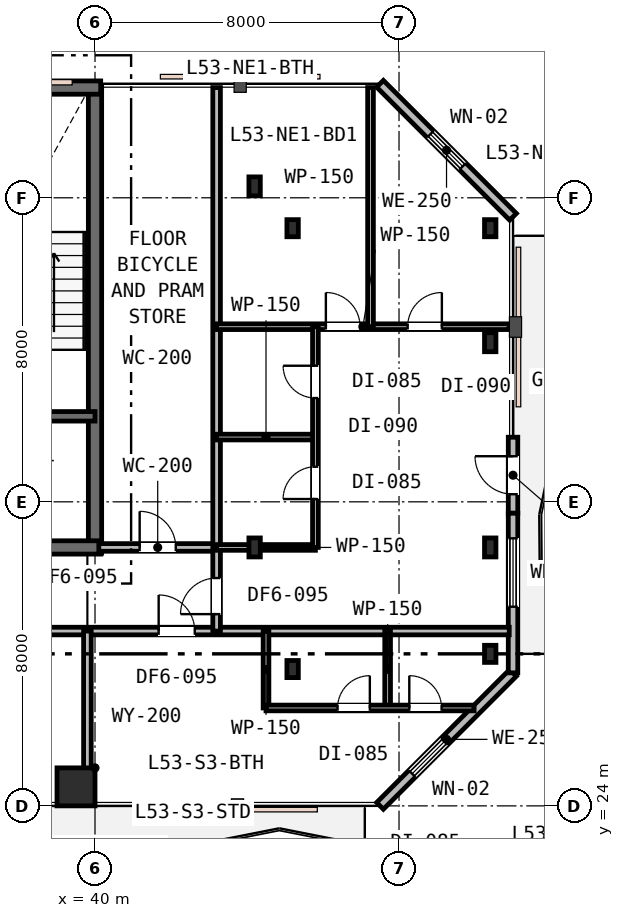
"""IFC4 building model, lengths in metres.
Left out: names, types, materials, properties, quantities, classifications, styles, units other than length and angle.
Written with IfcOpenShell. Run it as: python <this file> out.ifc"""

import sys

from ifc_helpers import new_model, si_unit, direction, frame, frame_2d, origin, origin_2d, place, context, subcontext, project, spatial, rectangle, i_section, extrude, element, fill, save


model = new_model("IFC4")
c1 = context("Model", 3, precision=1e-05, world=origin(), true_north=direction((0.0, 1.0)))
c2 = subcontext(c1, "Body", "Model", "MODEL_VIEW")
j1 = project(units=[si_unit("LENGTHUNIT", "METRE"), si_unit("PLANEANGLEUNIT", "RADIAN")], contexts=[c1])
p1 = place(None, origin())
s1 = spatial("IfcSite", under=j1, at=p1, CompositionType="ELEMENT")
p2 = place(p1, origin())
s2 = spatial("IfcBuilding", under=s1, at=p2, CompositionType="ELEMENT")
p3 = place(p2, frame((0.0, 0.0, 204.6)))
s3 = spatial("IfcBuildingStorey", under=s2, at=p3, CompositionType="ELEMENT", Elevation=204.6)
p4 = place(p3, frame((40.0, 30.65, 0.0), z_axis=(0.0, 0.0, 1.0), x_axis=(0.0, 1.0, 0.0)))
e1 = element("IfcWall", 1, at=p4, inside=s3, PredefinedType="SHEAR", context=c2, shape_type="SweptSolid", body=[
    extrude(rectangle(XDim=12.3, YDim=0.35, at=frame_2d((6.15, 0.0))), origin(), (0.0, 0.0, 1.0), 3.6),
])
p5 = place(p3, frame((15.85, 42.9, 0.0), z_axis=(0.0, 0.0, 1.0), x_axis=(1.0, 0.0, 0.0)))
e2 = element("IfcWall", 2, at=p5, inside=s3, PredefinedType="SHEAR", context=c2, shape_type="SweptSolid", body=[
    extrude(rectangle(XDim=24.3, YDim=0.35, at=frame_2d((12.15, 0.0))), origin(), (0.0, 0.0, 1.0), 3.6),
])
p6 = place(p5, frame((1.6, 0.0, 0.95)))
e3 = element("IfcOpeningElement", 3, at=p6, cuts=e2, PredefinedType="OPENING", context=c2, shape_type="SweptSolid", body=[
    extrude(rectangle(XDim=1.2, YDim=1.6, at=frame_2d((0.6, 0.8))), frame((0.0, 0.185, 0.0), z_axis=(0.0, -1.0, 0.0), x_axis=(1.0, 0.0, 0.0)), (0.0, 0.0, 1.0), 0.37),
])
p7 = place(p5, frame((16.5, 0.0, 0.95)))
e4 = element("IfcOpeningElement", 4, at=p7, cuts=e2, PredefinedType="OPENING", context=c2, shape_type="SweptSolid", body=[
    extrude(rectangle(XDim=1.2, YDim=1.6, at=frame_2d((0.6, 0.8))), frame((0.0, 0.185, 0.0), z_axis=(0.0, -1.0, 0.0), x_axis=(1.0, 0.0, 0.0)), (0.0, 0.0, 1.0), 0.37),
])
p8 = place(p5, frame((21.6, 0.0, 0.95)))
e5 = element("IfcOpeningElement", 5, at=p8, cuts=e2, PredefinedType="OPENING", context=c2, shape_type="SweptSolid", body=[
    extrude(rectangle(XDim=1.2, YDim=1.6, at=frame_2d((0.6, 0.8))), frame((0.0, 0.185, 0.0), z_axis=(0.0, -1.0, 0.0), x_axis=(1.0, 0.0, 0.0)), (0.0, 0.0, 1.0), 0.37),
])
p9 = place(p3, frame((28.95, 30.8, 0.0), z_axis=(0.0, 0.0, 1.0), x_axis=(1.0, 0.0, 0.0)))
e6 = element("IfcWall", 6, at=p9, inside=s3, PredefinedType="SHEAR", context=c2, shape_type="SweptSolid", body=[
    extrude(rectangle(XDim=11.2, YDim=0.35, at=frame_2d((5.6, 0.0))), origin(), (0.0, 0.0, 1.0), 3.6),
])
p10 = place(p9, frame((7.65, 0.0, 0.0)))
e7 = element("IfcOpeningElement", 7, at=p10, cuts=e6, PredefinedType="OPENING", context=c2, shape_type="SweptSolid", body=[
    extrude(rectangle(XDim=1.1, YDim=2.15, at=frame_2d((0.55, 1.075))), frame((0.0, 0.185, 0.0), z_axis=(0.0, -1.0, 0.0), x_axis=(1.0, 0.0, 0.0)), (0.0, 0.0, 1.0), 0.37),
])
p11 = place(p3, frame((33.95, 34.25, 0.0), z_axis=(0.0, 0.0, 1.0), x_axis=(1.0, 0.0, 0.0)))
e8 = element("IfcWall", 8, at=p11, inside=s3, PredefinedType="SHEAR", context=c2, shape_type="SweptSolid", body=[
    extrude(rectangle(XDim=6.05, YDim=0.25, at=frame_2d((3.025, 0.0))), origin(), (0.0, 0.0, 1.0), 3.6),
])
p12 = place(p11, frame((3.7, 0.0, 0.0)))
e9 = element("IfcOpeningElement", 9, at=p12, cuts=e8, PredefinedType="OPENING", context=c2, shape_type="SweptSolid", body=[
    extrude(rectangle(XDim=1.0, YDim=2.15, at=frame_2d((0.5, 1.075))), frame((0.0, 0.135, 0.0), z_axis=(0.0, -1.0, 0.0), x_axis=(1.0, 0.0, 0.0)), (0.0, 0.0, 1.0), 0.27),
])
p13 = place(p11, frame((0.55, 0.0, 0.0)))
e10 = element("IfcOpeningElement", 10, at=p13, cuts=e8, PredefinedType="OPENING", context=c2, shape_type="SweptSolid", body=[
    extrude(rectangle(XDim=1.1, YDim=2.15, at=frame_2d((0.55, 1.075))), frame((0.0, 0.135, 0.0), z_axis=(0.0, -1.0, 0.0), x_axis=(1.0, 0.0, 0.0)), (0.0, 0.0, 1.0), 0.27),
])
p14 = place(p3, frame((39.5, 24.5, 0.0), z_axis=(0.0, 0.0, 1.0), x_axis=(1.0, 0.0, 0.0)))
e11 = element("IfcColumn", 11, at=p14, inside=s3, PredefinedType="COLUMN", context=c2, shape_type="SweptSolid", body=[
    extrude(rectangle(XDim=1.0, YDim=1.0, at=origin_2d()), origin(), (0.0, 0.0, 1.0), 3.6),
])
for number, where, z_axis, x_axis in (
    (12, (45.2, 27.6, 0.0), (0.0, 0.0, 1.0), (1.0, 0.0, 0.0)),
    (13, (45.2, 39.2, 0.0), (0.0, 0.0, 1.0), (1.0, 0.0, 0.0)),
    (14, (50.4, 28.0, 0.0), (0.0, 0.0, 1.0), (1.0, 0.0, 0.0)),
    (15, (50.4, 39.2, 0.0), (0.0, 0.0, 1.0), (1.0, 0.0, 0.0)),
):
    element("IfcColumn", number, at=place(p3, frame(where, z_axis=z_axis, x_axis=x_axis)), inside=s3, PredefinedType="COLUMN", context=c2, shape_type="SweptSolid", body=[
        extrude(i_section(OverallWidth=0.3, OverallDepth=0.45, WebThickness=0.014, FlangeThickness=0.026, FilletRadius=0.027, at=origin_2d()), origin(), (0.0, 0.0, 1.0), 3.6),
    ])
for number, where, z_axis, x_axis in (
    (16, (44.2, 30.8, 0.0), (0.0, 0.0, 1.0), (1.0, 0.0, 0.0)),
    (17, (44.2, 40.3, 0.0), (0.0, 0.0, 1.0), (1.0, 0.0, 0.0)),
    (18, (50.4, 30.8, 0.0), (0.0, 0.0, 1.0), (1.0, 0.0, 0.0)),
    (19, (50.4, 36.2, 0.0), (0.0, 0.0, 1.0), (1.0, 0.0, 0.0)),
):
    element("IfcColumn", number, at=place(p3, frame(where, z_axis=z_axis, x_axis=x_axis)), inside=s3, PredefinedType="COLUMN", context=c2, shape_type="SweptSolid", body=[
        extrude(i_section(OverallWidth=0.3, OverallDepth=0.5, WebThickness=0.015, FlangeThickness=0.028, FilletRadius=0.027, at=origin_2d()), origin(), (0.0, 0.0, 1.0), 3.6),
    ])
p15 = place(p3, frame((47.5, 24.0, 0.0), z_axis=(0.0, 0.0, 1.0), x_axis=(0.707106781187, 0.707106781187, 0.0)))
e20 = element("IfcWall", 20, at=p15, inside=s3, PredefinedType="STANDARD", context=c2, shape_type="SweptSolid", body=[
    extrude(rectangle(XDim=4.95, YDim=0.25, at=frame_2d((2.475, 0.0))), origin(), (0.0, 0.0, 1.0), 3.24),
])
p16 = place(p15, frame((1.196, 0.0, 0.85)))
e21 = element("IfcOpeningElement", 21, at=p16, cuts=e20, PredefinedType="OPENING", context=c2, shape_type="SweptSolid", body=[
    extrude(rectangle(XDim=1.2, YDim=1.6, at=frame_2d((0.6, 0.8))), frame((0.0, 0.135, 0.0), z_axis=(0.0, -1.0, 0.0), x_axis=(1.0, 0.0, 0.0)), (0.0, 0.0, 1.0), 0.27),
])
p17 = place(p3, frame((51.0, 31.7, 0.0), z_axis=(0.0, 0.0, 1.0), x_axis=(0.0, 1.0, 0.0)))
e22 = element("IfcWall", 22, at=p17, inside=s3, PredefinedType="STANDARD", context=c2, shape_type="SweptSolid", body=[
    extrude(rectangle(XDim=2.0, YDim=0.25, at=frame_2d((1.0, 0.0))), origin(), (0.0, 0.0, 1.0), 3.24),
])
p18 = place(p17, frame((0.5, 0.0, 0.0)))
e23 = element("IfcOpeningElement", 23, at=p18, cuts=e22, PredefinedType="OPENING", context=c2, shape_type="SweptSolid", body=[
    extrude(rectangle(XDim=1.0, YDim=2.15, at=frame_2d((0.5, 1.075))), frame((0.0, 0.135, 0.0), z_axis=(0.0, -1.0, 0.0), x_axis=(1.0, 0.0, 0.0)), (0.0, 0.0, 1.0), 0.27),
])
p19 = place(p3, frame((51.0, 27.5, 0.0), z_axis=(0.0, 0.0, 1.0), x_axis=(0.0, 1.0, 0.0)))
e24 = element("IfcWall", 24, at=p19, inside=s3, PredefinedType="STANDARD", context=c2, shape_type="SweptSolid", body=[
    extrude(rectangle(XDim=4.2, YDim=0.25, at=frame_2d((2.1, 0.0))), origin(), (0.0, 0.0, 1.0), 3.24),
])
p20 = place(p19, frame((1.74, 0.0, 0.75)))
e25 = element("IfcOpeningElement", 25, at=p20, cuts=e24, PredefinedType="OPENING", context=c2, shape_type="SweptSolid", body=[
    extrude(rectangle(XDim=1.8, YDim=1.85, at=frame_2d((0.9, 0.925))), frame((0.0, 0.135, 0.0), z_axis=(0.0, -1.0, 0.0), x_axis=(1.0, 0.0, 0.0)), (0.0, 0.0, 1.0), 0.27),
])
p21 = place(p3, frame((51.0, 39.5, 0.0), z_axis=(0.0, 0.0, 1.0), x_axis=(-0.707106781187, 0.707106781187, 0.0)))
e26 = element("IfcWall", 26, at=p21, inside=s3, PredefinedType="STANDARD", context=c2, shape_type="SweptSolid", body=[
    extrude(rectangle(XDim=4.95, YDim=0.25, at=frame_2d((2.475, 0.0))), origin(), (0.0, 0.0, 1.0), 3.24),
])
p22 = place(p21, frame((1.875, 0.0, 0.85)))
e27 = element("IfcOpeningElement", 27, at=p22, cuts=e26, PredefinedType="OPENING", context=c2, shape_type="SweptSolid", body=[
    extrude(rectangle(XDim=1.2, YDim=1.6, at=frame_2d((0.6, 0.8))), frame((0.0, 0.135, 0.0), z_axis=(0.0, -1.0, 0.0), x_axis=(1.0, 0.0, 0.0)), (0.0, 0.0, 1.0), 0.27),
])
p23 = place(p3, frame((15.4, 28.6, 0.0), z_axis=(0.0, 0.0, 1.0), x_axis=(1.0, 0.0, 0.0)))
e28 = element("IfcWall", 28, at=p23, inside=s3, PredefinedType="PARTITIONING", context=c2, shape_type="SweptSolid", body=[
    extrude(rectangle(XDim=35.5, YDim=0.2, at=frame_2d((17.75, 0.0))), origin(), (0.0, 0.0, 1.0), 2.63),
])
p24 = place(p23, frame((11.525, 0.0, 0.0)))
e29 = element("IfcOpeningElement", 29, at=p24, cuts=e28, PredefinedType="OPENING", context=c2, shape_type="SweptSolid", body=[
    extrude(rectangle(XDim=0.95, YDim=2.15, at=frame_2d((0.475, 1.075))), frame((0.0, 0.11, 0.0), z_axis=(0.0, -1.0, 0.0), x_axis=(1.0, 0.0, 0.0)), (0.0, 0.0, 1.0), 0.22),
])
p25 = place(p23, frame((19.425, 0.0, 0.0)))
e30 = element("IfcOpeningElement", 30, at=p25, cuts=e28, PredefinedType="OPENING", context=c2, shape_type="SweptSolid", body=[
    extrude(rectangle(XDim=0.95, YDim=2.15, at=frame_2d((0.475, 1.075))), frame((0.0, 0.11, 0.0), z_axis=(0.0, -1.0, 0.0), x_axis=(1.0, 0.0, 0.0)), (0.0, 0.0, 1.0), 0.22),
])
p26 = place(p23, frame((26.275, 0.0, 0.0)))
e31 = element("IfcOpeningElement", 31, at=p26, cuts=e28, PredefinedType="OPENING", context=c2, shape_type="SweptSolid", body=[
    extrude(rectangle(XDim=0.95, YDim=2.15, at=frame_2d((0.475, 1.075))), frame((0.0, 0.11, 0.0), z_axis=(0.0, -1.0, 0.0), x_axis=(1.0, 0.0, 0.0)), (0.0, 0.0, 1.0), 0.22),
])
p27 = place(p3, frame((40.1, 30.8, 0.0), z_axis=(0.0, 0.0, 1.0), x_axis=(1.0, 0.0, 0.0)))
e32 = element("IfcWall", 32, at=p27, inside=s3, PredefinedType="PARTITIONING", context=c2, shape_type="SweptSolid", body=[
    extrude(rectangle(XDim=3.1, YDim=0.2, at=frame_2d((1.55, 0.0))), origin(), (0.0, 0.0, 1.0), 2.63),
])
p28 = place(p27, frame((1.075, 0.0, 0.0)))
e33 = element("IfcOpeningElement", 33, at=p28, cuts=e32, PredefinedType="OPENING", context=c2, shape_type="SweptSolid", body=[
    extrude(rectangle(XDim=0.95, YDim=2.15, at=frame_2d((0.475, 1.075))), frame((0.0, 0.11, 0.0), z_axis=(0.0, -1.0, 0.0), x_axis=(1.0, 0.0, 0.0)), (0.0, 0.0, 1.0), 0.22),
])
p29 = place(p3, frame((43.2, 28.6, 0.0), z_axis=(0.0, 0.0, 1.0), x_axis=(0.0, 1.0, 0.0)))
e34 = element("IfcWall", 34, at=p29, inside=s3, PredefinedType="PARTITIONING", context=c2, shape_type="SweptSolid", body=[
    extrude(rectangle(XDim=14.3, YDim=0.2, at=frame_2d((7.15, 0.0))), origin(), (0.0, 0.0, 1.0), 2.63),
])
p30 = place(p29, frame((0.445, 0.0, 0.0)))
e35 = element("IfcOpeningElement", 35, at=p30, cuts=e34, PredefinedType="OPENING", context=c2, shape_type="SweptSolid", body=[
    extrude(rectangle(XDim=0.95, YDim=2.15, at=frame_2d((0.475, 1.075))), frame((0.0, 0.11, 0.0), z_axis=(0.0, -1.0, 0.0), x_axis=(1.0, 0.0, 0.0)), (0.0, 0.0, 1.0), 0.22),
])
for number, where, z_axis, x_axis in (
    (36, (43.2, 30.8, 0.0), (0.0, 0.0, 1.0), (1.0, 0.0, 0.0)),
    (37, (43.2, 33.704, 0.0), (0.0, 0.0, 1.0), (1.0, 0.0, 0.0)),
):
    element("IfcWall", number, at=place(p3, frame(where, z_axis=z_axis, x_axis=x_axis)), inside=s3, PredefinedType="PARTITIONING", context=c2, shape_type="SweptSolid", body=[
        extrude(rectangle(XDim=2.6, YDim=0.15, at=frame_2d((1.3, 0.0))), origin(), (0.0, 0.0, 1.0), 2.63),
    ])
p31 = place(p3, frame((43.2, 36.608, 0.0), z_axis=(0.0, 0.0, 1.0), x_axis=(1.0, 0.0, 0.0)))
e38 = element("IfcWall", 38, at=p31, inside=s3, PredefinedType="PARTITIONING", context=c2, shape_type="SweptSolid", body=[
    extrude(rectangle(XDim=7.7, YDim=0.15, at=frame_2d((3.85, 0.0))), origin(), (0.0, 0.0, 1.0), 2.63),
])
p32 = place(p31, frame((2.875, 0.0, 0.0)))
e39 = element("IfcOpeningElement", 39, at=p32, cuts=e38, PredefinedType="OPENING", context=c2, shape_type="SweptSolid", body=[
    extrude(rectangle(XDim=0.9, YDim=2.15, at=frame_2d((0.45, 1.075))), frame((0.0, 0.085, 0.0), z_axis=(0.0, -1.0, 0.0), x_axis=(1.0, 0.0, 0.0)), (0.0, 0.0, 1.0), 0.17),
])
p33 = place(p31, frame((5.027, 0.0, 0.0)))
e40 = element("IfcOpeningElement", 40, at=p33, cuts=e38, PredefinedType="OPENING", context=c2, shape_type="SweptSolid", body=[
    extrude(rectangle(XDim=0.9, YDim=2.15, at=frame_2d((0.45, 1.075))), frame((0.0, 0.085, 0.0), z_axis=(0.0, -1.0, 0.0), x_axis=(1.0, 0.0, 0.0)), (0.0, 0.0, 1.0), 0.17),
])
p34 = place(p3, frame((45.8, 30.8, 0.0), z_axis=(0.0, 0.0, 1.0), x_axis=(0.0, 1.0, 0.0)))
e41 = element("IfcWall", 41, at=p34, inside=s3, PredefinedType="PARTITIONING", context=c2, shape_type="SweptSolid", body=[
    extrude(rectangle(XDim=5.808, YDim=0.15, at=frame_2d((2.904, 0.0))), origin(), (0.0, 0.0, 1.0), 2.63),
])
p35 = place(p34, frame((1.274, 0.0, 0.0)))
e42 = element("IfcOpeningElement", 42, at=p35, cuts=e41, PredefinedType="OPENING", context=c2, shape_type="SweptSolid", body=[
    extrude(rectangle(XDim=0.85, YDim=2.15, at=frame_2d((0.425, 1.075))), frame((0.0, 0.085, 0.0), z_axis=(0.0, -1.0, 0.0), x_axis=(1.0, 0.0, 0.0)), (0.0, 0.0, 1.0), 0.17),
])
p36 = place(p34, frame((3.931, 0.0, 0.0)))
e43 = element("IfcOpeningElement", 43, at=p36, cuts=e41, PredefinedType="OPENING", context=c2, shape_type="SweptSolid", body=[
    extrude(rectangle(XDim=0.85, YDim=2.15, at=frame_2d((0.425, 1.075))), frame((0.0, 0.085, 0.0), z_axis=(0.0, -1.0, 0.0), x_axis=(1.0, 0.0, 0.0)), (0.0, 0.0, 1.0), 0.17),
])
p37 = place(p3, frame((47.25, 36.608, 0.0), z_axis=(0.0, 0.0, 1.0), x_axis=(0.0, 1.0, 0.0)))
e44 = element("IfcWall", 44, at=p37, inside=s3, PredefinedType="PARTITIONING", context=c2, shape_type="SweptSolid", body=[
    extrude(rectangle(XDim=6.292, YDim=0.15, at=frame_2d((3.146, 0.0))), origin(), (0.0, 0.0, 1.0), 2.95),
])
p38 = place(p3, frame((39.8, 24.1, 0.0), z_axis=(0.0, 0.0, 1.0), x_axis=(0.0, 1.0, 0.0)))
e45 = element("IfcWall", 45, at=p38, inside=s3, PredefinedType="PARTITIONING", context=c2, shape_type="SweptSolid", body=[
    extrude(rectangle(XDim=4.5, YDim=0.2, at=frame_2d((2.25, 0.0))), origin(), (0.0, 0.0, 1.0), 2.63),
])
for number, where, z_axis, x_axis in (
    (46, (44.5, 26.576, 0.0), (0.0, 0.0, 1.0), (0.0, 1.0, 0.0)),
    (47, (47.7, 26.576, 0.0), (0.0, 0.0, 1.0), (0.0, 1.0, 0.0)),
):
    element("IfcWall", number, at=place(p3, frame(where, z_axis=z_axis, x_axis=x_axis)), inside=s3, PredefinedType="PARTITIONING", context=c2, shape_type="SweptSolid", body=[
        extrude(rectangle(XDim=2.024, YDim=0.15, at=frame_2d((1.012, 0.0))), origin(), (0.0, 0.0, 1.0), 3.24),
    ])
p39 = place(p3, frame((44.5, 26.576, 0.0), z_axis=(0.0, 0.0, 1.0), x_axis=(1.0, 0.0, 0.0)))
e48 = element("IfcWall", 48, at=p39, inside=s3, PredefinedType="PARTITIONING", context=c2, shape_type="SweptSolid", body=[
    extrude(rectangle(XDim=5.476, YDim=0.15, at=frame_2d((2.738, 0.0))), origin(), (0.0, 0.0, 1.0), 3.24),
])
p40 = place(p39, frame((1.882, 0.0, 0.0)))
e49 = element("IfcOpeningElement", 49, at=p40, cuts=e48, PredefinedType="OPENING", context=c2, shape_type="SweptSolid", body=[
    extrude(rectangle(XDim=0.85, YDim=2.15, at=frame_2d((0.425, 1.075))), frame((0.0, 0.085, 0.0), z_axis=(0.0, -1.0, 0.0), x_axis=(1.0, 0.0, 0.0)), (0.0, 0.0, 1.0), 0.17),
])
p41 = place(p39, frame((3.77, 0.0, 0.0)))
e50 = element("IfcOpeningElement", 50, at=p41, cuts=e48, PredefinedType="OPENING", context=c2, shape_type="SweptSolid", body=[
    extrude(rectangle(XDim=0.85, YDim=2.15, at=frame_2d((0.425, 1.075))), frame((0.0, 0.085, 0.0), z_axis=(0.0, -1.0, 0.0), x_axis=(1.0, 0.0, 0.0)), (0.0, 0.0, 1.0), 0.17),
])
p42 = place(p16, origin())
e51 = element("IfcWindow", 51, at=p42, inside=s3, PartitioningType="SINGLE_PANEL", PredefinedType="WINDOW", context=c2, shape_type="SweptSolid", body=[
    extrude(rectangle(XDim=1.2, YDim=1.6, at=frame_2d((0.6, 0.8))), frame((0.0, 0.03, 0.0), z_axis=(0.0, -1.0, 0.0), x_axis=(1.0, 0.0, 0.0)), (0.0, 0.0, 1.0), 0.06),
])
fill(e21, e51)
p43 = place(p18, origin())
e52 = element("IfcDoor", 52, at=p43, inside=s3, OperationType="SINGLE_SWING_RIGHT", PredefinedType="DOOR", context=c2, shape_type="SweptSolid", body=[
    extrude(rectangle(XDim=1.0, YDim=2.15, at=frame_2d((0.5, 1.075))), frame((0.0, 0.025, 0.0), z_axis=(0.0, -1.0, 0.0), x_axis=(1.0, 0.0, 0.0)), (0.0, 0.0, 1.0), 0.05),
])
fill(e23, e52)
p44 = place(p20, origin())
e53 = element("IfcWindow", 53, at=p44, inside=s3, PartitioningType="SINGLE_PANEL", PredefinedType="WINDOW", context=c2, shape_type="SweptSolid", body=[
    extrude(rectangle(XDim=1.8, YDim=1.85, at=frame_2d((0.9, 0.925))), frame((0.0, 0.03, 0.0), z_axis=(0.0, -1.0, 0.0), x_axis=(1.0, 0.0, 0.0)), (0.0, 0.0, 1.0), 0.06),
])
fill(e25, e53)
p45 = place(p22, origin())
e54 = element("IfcWindow", 54, at=p45, inside=s3, PartitioningType="SINGLE_PANEL", PredefinedType="WINDOW", context=c2, shape_type="SweptSolid", body=[
    extrude(rectangle(XDim=1.2, YDim=1.6, at=frame_2d((0.6, 0.8))), frame((0.0, 0.03, 0.0), z_axis=(0.0, -1.0, 0.0), x_axis=(1.0, 0.0, 0.0)), (0.0, 0.0, 1.0), 0.06),
])
fill(e27, e54)
p46 = place(p28, origin())
e55 = element("IfcDoor", 55, at=p46, inside=s3, OperationType="SINGLE_SWING_LEFT", PredefinedType="DOOR", context=c2, shape_type="SweptSolid", body=[
    extrude(rectangle(XDim=0.95, YDim=2.15, at=frame_2d((0.475, 1.075))), frame((0.0, 0.025, 0.0), z_axis=(0.0, -1.0, 0.0), x_axis=(1.0, 0.0, 0.0)), (0.0, 0.0, 1.0), 0.05),
])
fill(e33, e55)
p47 = place(p30, origin())
e56 = element("IfcDoor", 56, at=p47, inside=s3, OperationType="SINGLE_SWING_LEFT", PredefinedType="DOOR", context=c2, shape_type="SweptSolid", body=[
    extrude(rectangle(XDim=0.95, YDim=2.15, at=frame_2d((0.475, 1.075))), frame((0.0, 0.025, 0.0), z_axis=(0.0, -1.0, 0.0), x_axis=(1.0, 0.0, 0.0)), (0.0, 0.0, 1.0), 0.05),
])
fill(e35, e56)
p48 = place(p35, origin())
e57 = element("IfcDoor", 57, at=p48, inside=s3, OperationType="SINGLE_SWING_LEFT", PredefinedType="DOOR", context=c2, shape_type="SweptSolid", body=[
    extrude(rectangle(XDim=0.85, YDim=2.15, at=frame_2d((0.425, 1.075))), frame((0.0, 0.025, 0.0), z_axis=(0.0, -1.0, 0.0), x_axis=(1.0, 0.0, 0.0)), (0.0, 0.0, 1.0), 0.05),
])
fill(e42, e57)
p49 = place(p36, origin())
e58 = element("IfcDoor", 58, at=p49, inside=s3, OperationType="SINGLE_SWING_RIGHT", PredefinedType="DOOR", context=c2, shape_type="SweptSolid", body=[
    extrude(rectangle(XDim=0.85, YDim=2.15, at=frame_2d((0.425, 1.075))), frame((0.0, 0.025, 0.0), z_axis=(0.0, -1.0, 0.0), x_axis=(1.0, 0.0, 0.0)), (0.0, 0.0, 1.0), 0.05),
])
fill(e43, e58)
p50 = place(p32, origin())
e59 = element("IfcDoor", 59, at=p50, inside=s3, OperationType="SINGLE_SWING_LEFT", PredefinedType="DOOR", context=c2, shape_type="SweptSolid", body=[
    extrude(rectangle(XDim=0.9, YDim=2.15, at=frame_2d((0.45, 1.075))), frame((0.0, 0.025, 0.0), z_axis=(0.0, -1.0, 0.0), x_axis=(1.0, 0.0, 0.0)), (0.0, 0.0, 1.0), 0.05),
])
fill(e39, e59)
p51 = place(p33, origin())
e60 = element("IfcDoor", 60, at=p51, inside=s3, OperationType="SINGLE_SWING_RIGHT", PredefinedType="DOOR", context=c2, shape_type="SweptSolid", body=[
    extrude(rectangle(XDim=0.9, YDim=2.15, at=frame_2d((0.45, 1.075))), frame((0.0, 0.025, 0.0), z_axis=(0.0, -1.0, 0.0), x_axis=(1.0, 0.0, 0.0)), (0.0, 0.0, 1.0), 0.05),
])
fill(e40, e60)
p52 = place(p26, origin())
e61 = element("IfcDoor", 61, at=p52, inside=s3, OperationType="SINGLE_SWING_LEFT", PredefinedType="DOOR", context=c2, shape_type="SweptSolid", body=[
    extrude(rectangle(XDim=0.95, YDim=2.15, at=frame_2d((0.475, 1.075))), frame((0.0, 0.025, 0.0), z_axis=(0.0, -1.0, 0.0), x_axis=(1.0, 0.0, 0.0)), (0.0, 0.0, 1.0), 0.05),
])
fill(e31, e61)
p53 = place(p40, origin())
e62 = element("IfcDoor", 62, at=p53, inside=s3, OperationType="SINGLE_SWING_RIGHT", PredefinedType="DOOR", context=c2, shape_type="SweptSolid", body=[
    extrude(rectangle(XDim=0.85, YDim=2.15, at=frame_2d((0.425, 1.075))), frame((0.0, 0.025, 0.0), z_axis=(0.0, -1.0, 0.0), x_axis=(1.0, 0.0, 0.0)), (0.0, 0.0, 1.0), 0.05),
])
fill(e49, e62)
p54 = place(p41, origin())
e63 = element("IfcDoor", 63, at=p54, inside=s3, OperationType="SINGLE_SWING_LEFT", PredefinedType="DOOR", context=c2, shape_type="SweptSolid", body=[
    extrude(rectangle(XDim=0.85, YDim=2.15, at=frame_2d((0.425, 1.075))), frame((0.0, 0.025, 0.0), z_axis=(0.0, -1.0, 0.0), x_axis=(1.0, 0.0, 0.0)), (0.0, 0.0, 1.0), 0.05),
])
fill(e50, e63)
save(model, sys.argv[1])
